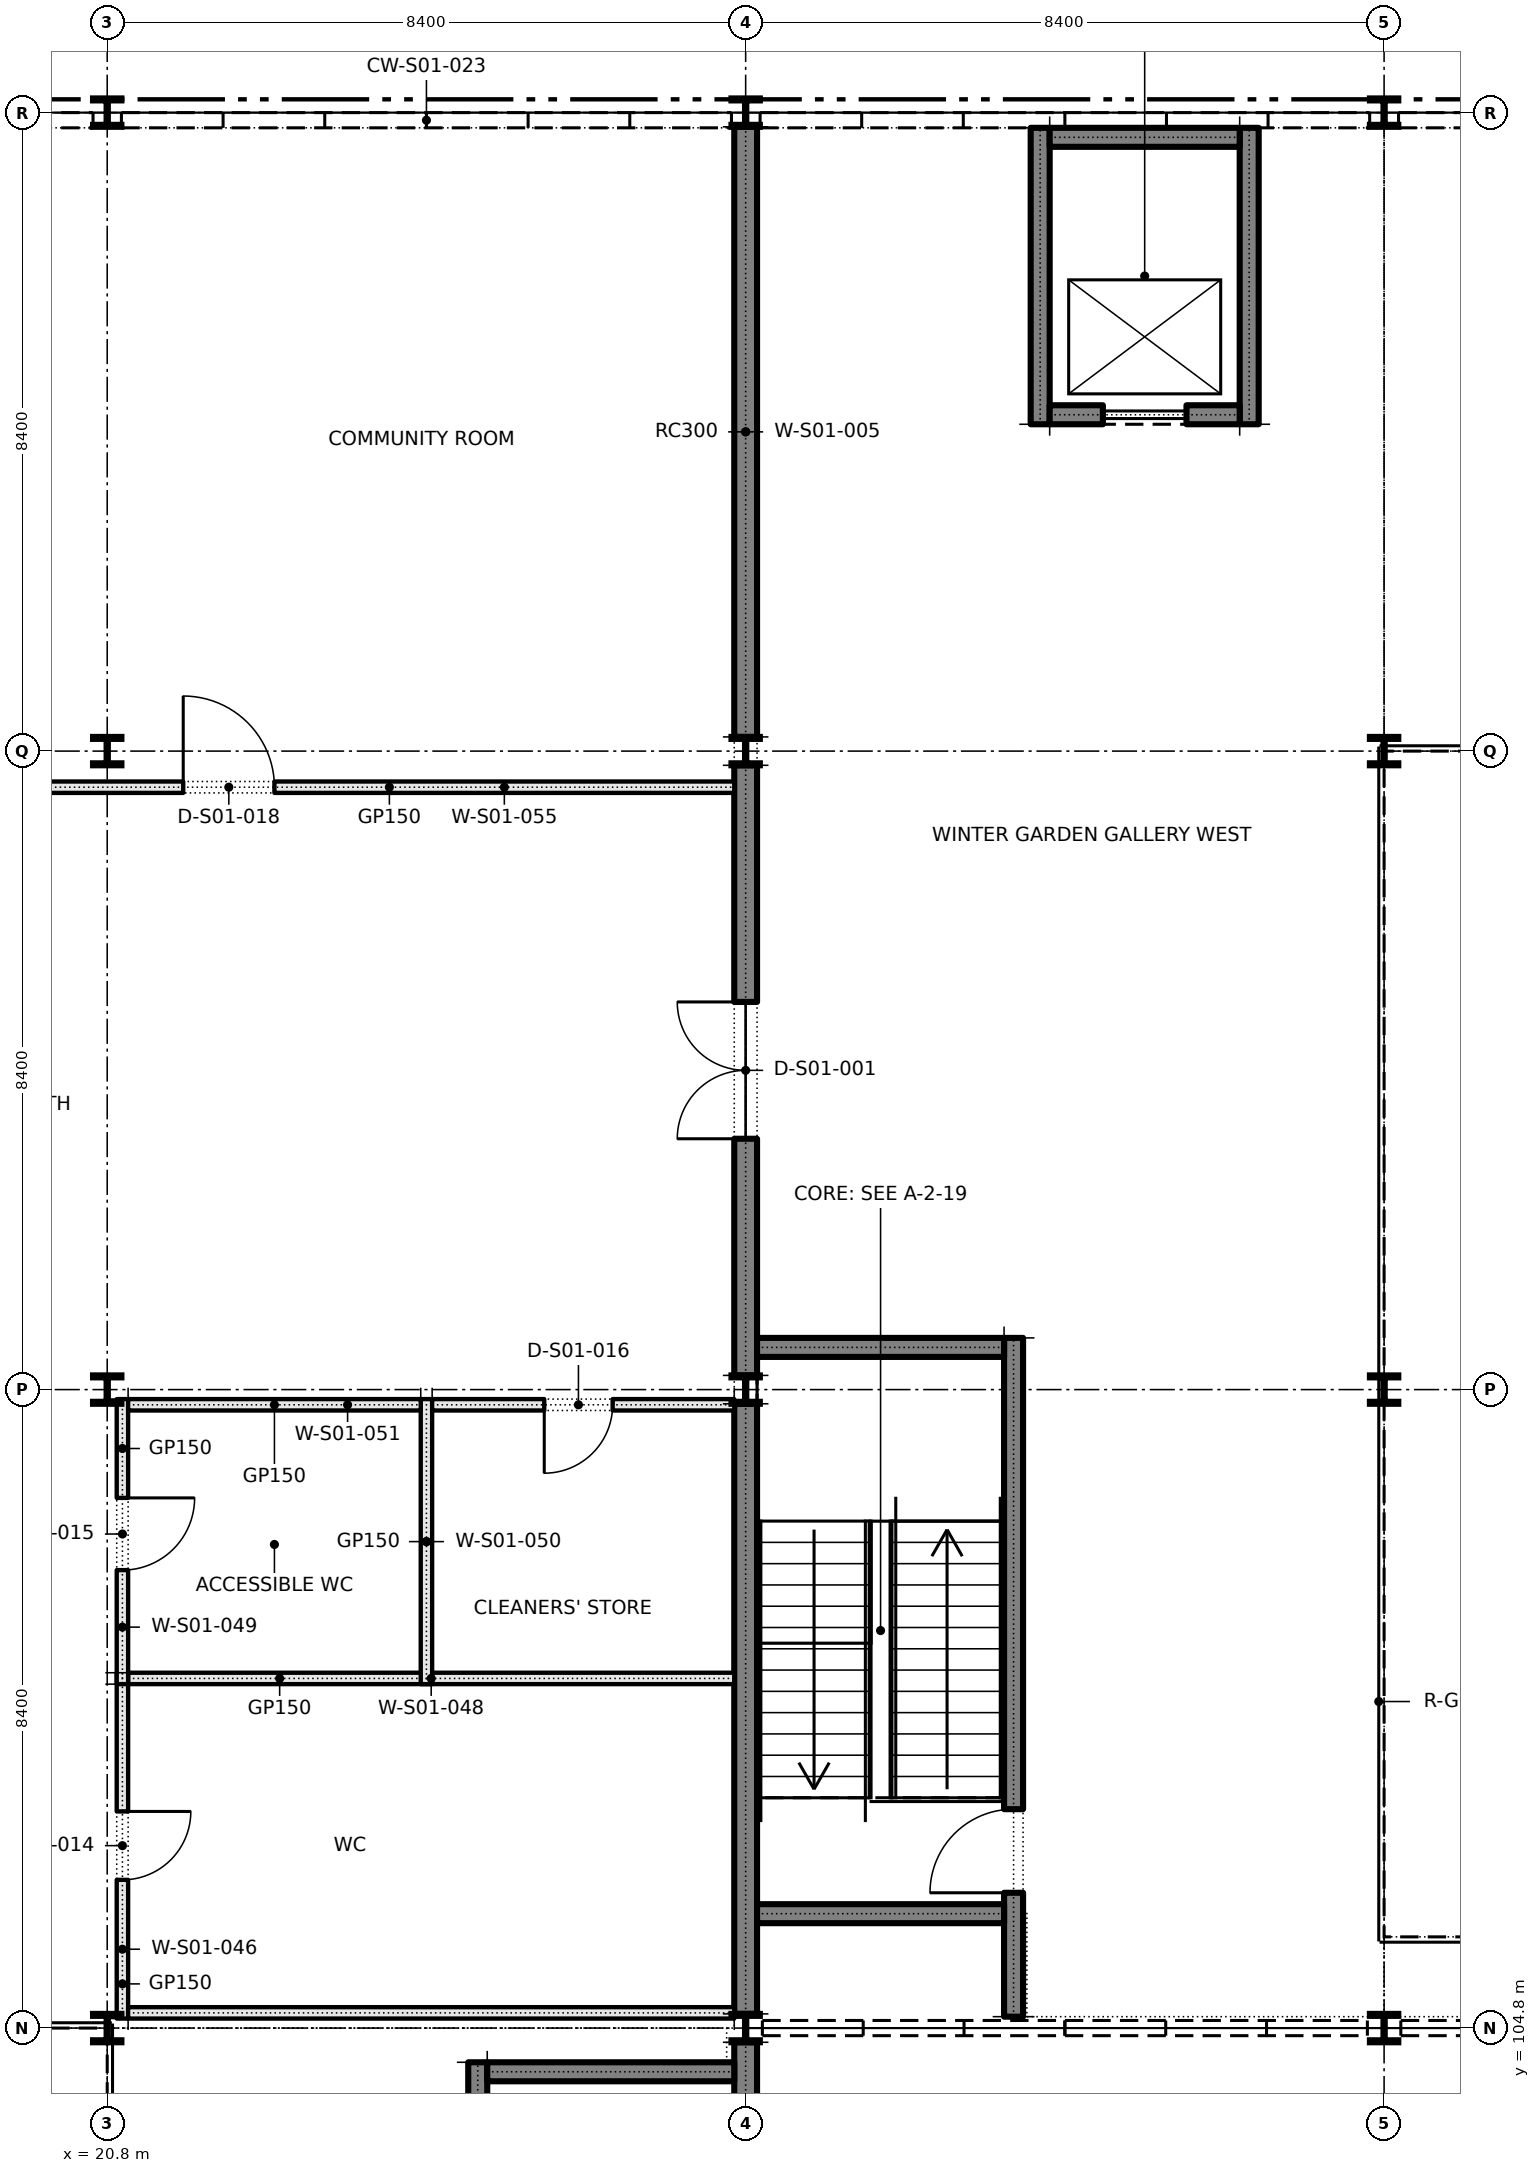
"""IFC4 building model, lengths in metres.
Left out: names, types, materials, properties, quantities, classifications, styles, units other than length and angle.
Written with IfcOpenShell. Run it as: python <this file> out.ifc"""

import sys

from ifc_helpers import new_model, si_unit, direction, frame, frame_2d, origin, origin_2d, place, context, subcontext, project, spatial, rectangle, i_section, extrude, element, fill, save


model = new_model("IFC4")
c1 = context("Model", 3, precision=1e-05, world=origin(), true_north=direction((0.0, 1.0)))
c2 = subcontext(c1, "Body", "Model", "MODEL_VIEW")
j1 = project(units=[si_unit("LENGTHUNIT", "METRE"), si_unit("PLANEANGLEUNIT", "RADIAN")], contexts=[c1])
p1 = place(None, origin())
s1 = spatial("IfcSite", under=j1, at=p1, CompositionType="ELEMENT")
p2 = place(p1, origin())
s2 = spatial("IfcBuilding", under=s1, at=p2, CompositionType="ELEMENT")
p3 = place(p2, frame((0.0, 0.0, 5.4)))
s3 = spatial("IfcBuildingStorey", under=s2, at=p3, CompositionType="ELEMENT", Elevation=5.4)
for number, where, z_axis, x_axis in (
    (1, (20.8, 104.8, 0.0), (0.0, 0.0, 1.0), (1.0, 0.0, 0.0)),
    (2, (20.8, 113.2, 0.0), (0.0, 0.0, 1.0), (1.0, 0.0, 0.0)),
    (3, (20.8, 121.6, 0.0), (0.0, 0.0, 1.0), (1.0, 0.0, 0.0)),
    (4, (29.2, 104.8, 0.0), (0.0, 0.0, 1.0), (1.0, 0.0, 0.0)),
    (5, (29.2, 113.2, 0.0), (0.0, 0.0, 1.0), (1.0, 0.0, 0.0)),
    (6, (29.2, 121.6, 0.0), (0.0, 0.0, 1.0), (1.0, 0.0, 0.0)),
    (7, (20.8, 130.0, 0.0), (0.0, 0.0, 1.0), (1.0, 0.0, 0.0)),
    (8, (29.2, 130.0, 0.0), (0.0, 0.0, 1.0), (1.0, 0.0, 0.0)),
    (9, (37.6, 104.8, 0.0), (0.0, 0.0, 1.0), (1.0, 0.0, 0.0)),
    (10, (37.6, 113.2, 0.0), (0.0, 0.0, 1.0), (1.0, 0.0, 0.0)),
    (11, (37.6, 121.6, 0.0), (0.0, 0.0, 1.0), (1.0, 0.0, 0.0)),
    (12, (37.6, 130.0, 0.0), (0.0, 0.0, 1.0), (1.0, 0.0, 0.0)),
):
    element("IfcColumn", number, at=place(p3, frame(where, z_axis=z_axis, x_axis=x_axis)), inside=s3, PredefinedType="COLUMN", context=c2, shape_type="SweptSolid", body=[
        extrude(i_section(OverallWidth=0.373, OverallDepth=0.373, WebThickness=0.016, FlangeThickness=0.026, FilletRadius=0.015, at=origin_2d()), origin(), (0.0, 0.0, 1.0), 4.8),
    ])
p4 = place(p3, frame((29.2, 96.65, 0.0), z_axis=(0.0, 0.0, 1.0), x_axis=(0.0, 1.0, 0.0)))
e13 = element("IfcWall", 13, at=p4, inside=s3, PredefinedType="SOLIDWALL", context=c2, shape_type="SweptSolid", body=[
    extrude(rectangle(XDim=7.963, YDim=0.3, at=frame_2d((3.982, 0.0))), origin(), (0.0, 0.0, 1.0), 4.8),
])
p5 = place(p3, frame((29.2, 104.987, 0.0), z_axis=(0.0, 0.0, 1.0), x_axis=(0.0, 1.0, 0.0)))
e14 = element("IfcWall", 14, at=p5, inside=s3, PredefinedType="SOLIDWALL", context=c2, shape_type="SweptSolid", body=[
    extrude(rectangle(XDim=8.027, YDim=0.3, at=frame_2d((4.013, 0.0))), origin(), (0.0, 0.0, 1.0), 4.8),
])
p6 = place(p3, frame((29.2, 113.387, 0.0), z_axis=(0.0, 0.0, 1.0), x_axis=(0.0, 1.0, 0.0)))
e15 = element("IfcWall", 15, at=p6, inside=s3, PredefinedType="SOLIDWALL", context=c2, shape_type="SweptSolid", body=[
    extrude(rectangle(XDim=8.027, YDim=0.3, at=frame_2d((4.013, 0.0))), origin(), (0.0, 0.0, 1.0), 4.8),
])
p7 = place(p6, frame((3.113, 0.0, 0.0)))
e16 = element("IfcOpeningElement", 16, at=p7, cuts=e15, PredefinedType="OPENING", context=c2, shape_type="SweptSolid", body=[
    extrude(rectangle(XDim=1.8, YDim=2.4, at=frame_2d((0.9, 1.2))), frame((0.0, 0.16, 0.0), z_axis=(0.0, -1.0, 0.0), x_axis=(1.0, 0.0, 0.0)), (0.0, 0.0, 1.0), 0.32),
])
p8 = place(p3, frame((29.2, 121.787, 0.0), z_axis=(0.0, 0.0, 1.0), x_axis=(0.0, 1.0, 0.0)))
e17 = element("IfcWall", 17, at=p8, inside=s3, PredefinedType="SOLIDWALL", context=c2, shape_type="SweptSolid", body=[
    extrude(rectangle(XDim=8.027, YDim=0.3, at=frame_2d((4.013, 0.0))), origin(), (0.0, 0.0, 1.0), 4.8),
])
p9 = place(p3, frame((25.675, 96.65, 0.0), z_axis=(0.0, 0.0, 1.0), x_axis=(0.0, 1.0, 0.0)))
e18 = element("IfcWall", 18, at=p9, inside=s3, PredefinedType="SHEAR", context=c2, shape_type="SweptSolid", body=[
    extrude(rectangle(XDim=7.7, YDim=0.25, at=frame_2d((3.85, 0.0))), origin(), (0.0, 0.0, 1.0), 4.8),
])
p10 = place(p9, frame((0.4, 0.0, 0.0)))
e19 = element("IfcOpeningElement", 19, at=p10, cuts=e18, PredefinedType="OPENING", context=c2, shape_type="SweptSolid", body=[
    extrude(rectangle(XDim=1.1, YDim=2.1, at=frame_2d((0.55, 1.05))), frame((0.0, 0.135, 0.0), z_axis=(0.0, -1.0, 0.0), x_axis=(1.0, 0.0, 0.0)), (0.0, 0.0, 1.0), 0.27),
])
p11 = place(p3, frame((25.8, 104.225, 0.0), z_axis=(0.0, 0.0, 1.0), x_axis=(1.0, 0.0, 0.0)))
e20 = element("IfcWall", 20, at=p11, inside=s3, PredefinedType="SHEAR", context=c2, shape_type="SweptSolid", body=[
    extrude(rectangle(XDim=3.25, YDim=0.25, at=frame_2d((1.625, 0.0))), origin(), (0.0, 0.0, 1.0), 4.8),
])
p12 = place(p3, frame((21.0, 104.925, 0.0), z_axis=(0.0, 0.0, 1.0), x_axis=(0.0, 1.0, 0.0)))
e21 = element("IfcWall", 21, at=p12, inside=s3, PredefinedType="PARTITIONING", context=c2, shape_type="SweptSolid", body=[
    extrude(rectangle(XDim=4.55, YDim=0.15, at=frame_2d((2.275, 0.0))), origin(), (0.0, 0.0, 1.0), 4.8),
])
p13 = place(p12, frame((1.825, 0.0, 0.0)))
e22 = element("IfcOpeningElement", 22, at=p13, cuts=e21, PredefinedType="OPENING", context=c2, shape_type="SweptSolid", body=[
    extrude(rectangle(XDim=0.9, YDim=2.1, at=frame_2d((0.45, 1.05))), frame((0.0, 0.085, 0.0), z_axis=(0.0, -1.0, 0.0), x_axis=(1.0, 0.0, 0.0)), (0.0, 0.0, 1.0), 0.17),
])
for number, where, z_axis, x_axis in (
    (23, (21.075, 105.0, 0.0), (0.0, 0.0, 1.0), (1.0, 0.0, 0.0)),
    (24, (21.075, 109.4, 0.0), (0.0, 0.0, 1.0), (1.0, 0.0, 0.0)),
):
    element("IfcWall", number, at=place(p3, frame(where, z_axis=z_axis, x_axis=x_axis)), inside=s3, PredefinedType="PARTITIONING", context=c2, shape_type="SweptSolid", body=[
        extrude(rectangle(XDim=7.975, YDim=0.15, at=frame_2d((3.988, 0.0))), origin(), (0.0, 0.0, 1.0), 4.8),
    ])
p14 = place(p3, frame((21.0, 109.325, 0.0), z_axis=(0.0, 0.0, 1.0), x_axis=(0.0, 1.0, 0.0)))
e25 = element("IfcWall", 25, at=p14, inside=s3, PredefinedType="PARTITIONING", context=c2, shape_type="SweptSolid", body=[
    extrude(rectangle(XDim=3.75, YDim=0.15, at=frame_2d((1.875, 0.0))), origin(), (0.0, 0.0, 1.0), 4.8),
])
p15 = place(p14, frame((1.5, 0.0, 0.0)))
e26 = element("IfcOpeningElement", 26, at=p15, cuts=e25, PredefinedType="OPENING", context=c2, shape_type="SweptSolid", body=[
    extrude(rectangle(XDim=0.95, YDim=2.1, at=frame_2d((0.475, 1.05))), frame((0.0, 0.085, 0.0), z_axis=(0.0, -1.0, 0.0), x_axis=(1.0, 0.0, 0.0)), (0.0, 0.0, 1.0), 0.17),
])
p16 = place(p3, frame((25.0, 109.325, 0.0), z_axis=(0.0, 0.0, 1.0), x_axis=(0.0, 1.0, 0.0)))
e27 = element("IfcWall", 27, at=p16, inside=s3, PredefinedType="PARTITIONING", context=c2, shape_type="SweptSolid", body=[
    extrude(rectangle(XDim=3.75, YDim=0.15, at=frame_2d((1.875, 0.0))), origin(), (0.0, 0.0, 1.0), 4.8),
])
p17 = place(p3, frame((21.075, 113.0, 0.0), z_axis=(0.0, 0.0, 1.0), x_axis=(1.0, 0.0, 0.0)))
e28 = element("IfcWall", 28, at=p17, inside=s3, PredefinedType="PARTITIONING", context=c2, shape_type="SweptSolid", body=[
    extrude(rectangle(XDim=3.85, YDim=0.15, at=frame_2d((1.925, 0.0))), origin(), (0.0, 0.0, 1.0), 4.8),
])
p18 = place(p3, frame((25.075, 113.0, 0.0), z_axis=(0.0, 0.0, 1.0), x_axis=(1.0, 0.0, 0.0)))
e29 = element("IfcWall", 29, at=p18, inside=s3, PredefinedType="PARTITIONING", context=c2, shape_type="SweptSolid", body=[
    extrude(rectangle(XDim=3.975, YDim=0.15, at=frame_2d((1.988, 0.0))), origin(), (0.0, 0.0, 1.0), 4.8),
])
p19 = place(p18, frame((1.475, 0.0, 0.0)))
e30 = element("IfcOpeningElement", 30, at=p19, cuts=e29, PredefinedType="OPENING", context=c2, shape_type="SweptSolid", body=[
    extrude(rectangle(XDim=0.9, YDim=2.1, at=frame_2d((0.45, 1.05))), frame((0.0, 0.085, 0.0), z_axis=(0.0, -1.0, 0.0), x_axis=(1.0, 0.0, 0.0)), (0.0, 0.0, 1.0), 0.17),
])
p20 = place(p3, frame((16.075, 121.125, 0.0), z_axis=(0.0, 0.0, 1.0), x_axis=(1.0, 0.0, 0.0)))
e31 = element("IfcWall", 31, at=p20, inside=s3, PredefinedType="PARTITIONING", context=c2, shape_type="SweptSolid", body=[
    extrude(rectangle(XDim=12.975, YDim=0.15, at=frame_2d((6.488, 0.0))), origin(), (0.0, 0.0, 1.0), 4.8),
])
p21 = place(p20, frame((5.725, 0.0, 0.0)))
e32 = element("IfcOpeningElement", 32, at=p21, cuts=e31, PredefinedType="OPENING", context=c2, shape_type="SweptSolid", body=[
    extrude(rectangle(XDim=1.2, YDim=2.1, at=frame_2d((0.6, 1.05))), frame((0.0, 0.085, 0.0), z_axis=(0.0, -1.0, 0.0), x_axis=(1.0, 0.0, 0.0)), (0.0, 0.0, 1.0), 0.17),
])
p22 = place(p3, frame((32.725, 104.95, 0.0), z_axis=(0.0, 0.0, 1.0), x_axis=(0.0, 1.0, 0.0)))
e33 = element("IfcWall", 33, at=p22, inside=s3, PredefinedType="SHEAR", context=c2, shape_type="SweptSolid", body=[
    extrude(rectangle(XDim=8.93, YDim=0.25, at=frame_2d((4.465, 0.0))), origin(), (0.0, 0.0, 1.0), 4.8),
])
p23 = place(p22, frame((1.63, 0.0, 0.0)))
e34 = element("IfcOpeningElement", 34, at=p23, cuts=e33, PredefinedType="OPENING", context=c2, shape_type="SweptSolid", body=[
    extrude(rectangle(XDim=1.1, YDim=2.1, at=frame_2d((0.55, 1.05))), frame((0.0, 0.135, 0.0), z_axis=(0.0, -1.0, 0.0), x_axis=(1.0, 0.0, 0.0)), (0.0, 0.0, 1.0), 0.27),
])
for number, where, z_axis, x_axis in (
    (35, (29.35, 113.755, 0.0), (0.0, 0.0, 1.0), (1.0, 0.0, 0.0)),
    (36, (29.35, 106.305, 0.0), (0.0, 0.0, 1.0), (1.0, 0.0, 0.0)),
):
    element("IfcWall", number, at=place(p3, frame(where, z_axis=z_axis, x_axis=x_axis)), inside=s3, PredefinedType="SHEAR", context=c2, shape_type="SweptSolid", body=[
        extrude(rectangle(XDim=3.25, YDim=0.25, at=frame_2d((1.625, 0.0))), origin(), (0.0, 0.0, 1.0), 4.8),
    ])
for number, where, z_axis, x_axis in (
    (37, (33.075, 125.9, 0.0), (0.0, 0.0, 1.0), (0.0, 1.0, 0.0)),
    (38, (35.825, 125.9, 0.0), (0.0, 0.0, 1.0), (0.0, 1.0, 0.0)),
):
    element("IfcWall", number, at=place(p3, frame(where, z_axis=z_axis, x_axis=x_axis)), inside=s3, PredefinedType="SOLIDWALL", context=c2, shape_type="SweptSolid", body=[
        extrude(rectangle(XDim=3.9, YDim=0.25, at=frame_2d((1.95, 0.0))), origin(), (0.0, 0.0, 1.0), 4.8),
    ])
p24 = place(p3, frame((33.2, 126.025, 0.0), z_axis=(0.0, 0.0, 1.0), x_axis=(1.0, 0.0, 0.0)))
e39 = element("IfcWall", 39, at=p24, inside=s3, PredefinedType="SOLIDWALL", context=c2, shape_type="SweptSolid", body=[
    extrude(rectangle(XDim=2.5, YDim=0.25, at=frame_2d((1.25, 0.0))), origin(), (0.0, 0.0, 1.0), 4.8),
])
p25 = place(p24, frame((0.7, 0.0, 0.0)))
e40 = element("IfcOpeningElement", 40, at=p25, cuts=e39, PredefinedType="OPENING", context=c2, shape_type="SweptSolid", body=[
    extrude(rectangle(XDim=1.1, YDim=2.1, at=frame_2d((0.55, 1.05))), frame((0.0, 0.135, 0.0), z_axis=(0.0, -1.0, 0.0), x_axis=(1.0, 0.0, 0.0)), (0.0, 0.0, 1.0), 0.27),
])
p26 = place(p3, frame((33.2, 129.675, 0.0), z_axis=(0.0, 0.0, 1.0), x_axis=(1.0, 0.0, 0.0)))
e41 = element("IfcWall", 41, at=p26, inside=s3, PredefinedType="SOLIDWALL", context=c2, shape_type="SweptSolid", body=[
    extrude(rectangle(XDim=2.5, YDim=0.25, at=frame_2d((1.25, 0.0))), origin(), (0.0, 0.0, 1.0), 4.8),
])
p27 = place(p7, origin())
e42 = element("IfcDoor", 42, at=p27, inside=s3, OperationType="DOUBLE_DOOR_SINGLE_SWING", PredefinedType="DOOR", context=c2, shape_type="SweptSolid", body=[
    extrude(rectangle(XDim=1.8, YDim=2.4, at=frame_2d((0.9, 1.2))), frame((0.0, 0.025, 0.0), z_axis=(0.0, -1.0, 0.0), x_axis=(1.0, 0.0, 0.0)), (0.0, 0.0, 1.0), 0.05),
])
fill(e16, e42)
p28 = place(p13, frame((0.9, 0.0, 0.0), z_axis=(0.0, 0.0, 1.0), x_axis=(-1.0, 0.0, 0.0)))
e43 = element("IfcDoor", 43, at=p28, inside=s3, OperationType="SINGLE_SWING_LEFT", PredefinedType="DOOR", context=c2, shape_type="SweptSolid", body=[
    extrude(rectangle(XDim=0.9, YDim=2.1, at=frame_2d((0.45, 1.05))), frame((0.0, 0.025, 0.0), z_axis=(0.0, -1.0, 0.0), x_axis=(1.0, 0.0, 0.0)), (0.0, 0.0, 1.0), 0.05),
])
fill(e22, e43)
p29 = place(p15, frame((0.95, 0.0, 0.0), z_axis=(0.0, 0.0, 1.0), x_axis=(-1.0, 0.0, 0.0)))
e44 = element("IfcDoor", 44, at=p29, inside=s3, OperationType="SINGLE_SWING_LEFT", PredefinedType="DOOR", context=c2, shape_type="SweptSolid", body=[
    extrude(rectangle(XDim=0.95, YDim=2.1, at=frame_2d((0.475, 1.05))), frame((0.0, 0.025, 0.0), z_axis=(0.0, -1.0, 0.0), x_axis=(1.0, 0.0, 0.0)), (0.0, 0.0, 1.0), 0.05),
])
fill(e26, e44)
p30 = place(p19, frame((0.9, 0.0, 0.0), z_axis=(0.0, 0.0, 1.0), x_axis=(-1.0, 0.0, 0.0)))
e45 = element("IfcDoor", 45, at=p30, inside=s3, OperationType="SINGLE_SWING_RIGHT", PredefinedType="DOOR", context=c2, shape_type="SweptSolid", body=[
    extrude(rectangle(XDim=0.9, YDim=2.1, at=frame_2d((0.45, 1.05))), frame((0.0, 0.025, 0.0), z_axis=(0.0, -1.0, 0.0), x_axis=(1.0, 0.0, 0.0)), (0.0, 0.0, 1.0), 0.05),
])
fill(e30, e45)
p31 = place(p21, origin())
e46 = element("IfcDoor", 46, at=p31, inside=s3, OperationType="SINGLE_SWING_LEFT", PredefinedType="DOOR", context=c2, shape_type="SweptSolid", body=[
    extrude(rectangle(XDim=1.2, YDim=2.1, at=frame_2d((0.6, 1.05))), frame((0.0, 0.025, 0.0), z_axis=(0.0, -1.0, 0.0), x_axis=(1.0, 0.0, 0.0)), (0.0, 0.0, 1.0), 0.05),
])
fill(e32, e46)
p32 = place(p23, origin())
e47 = element("IfcDoor", 47, at=p32, inside=s3, OperationType="SINGLE_SWING_LEFT", PredefinedType="DOOR", context=c2, shape_type="SweptSolid", body=[
    extrude(rectangle(XDim=1.1, YDim=2.1, at=frame_2d((0.55, 1.05))), frame((0.0, 0.025, 0.0), z_axis=(0.0, -1.0, 0.0), x_axis=(1.0, 0.0, 0.0)), (0.0, 0.0, 1.0), 0.05),
])
fill(e34, e47)
p33 = place(p25, origin())
e48 = element("IfcDoor", 48, at=p33, inside=s3, OperationType="SLIDING_TO_LEFT", PredefinedType="DOOR", context=c2, shape_type="SweptSolid", body=[
    extrude(rectangle(XDim=1.1, YDim=2.1, at=frame_2d((0.55, 1.05))), frame((0.0, 0.025, 0.0), z_axis=(0.0, -1.0, 0.0), x_axis=(1.0, 0.0, 0.0)), (0.0, 0.0, 1.0), 0.05),
])
fill(e40, e48)
save(model, sys.argv[1])
